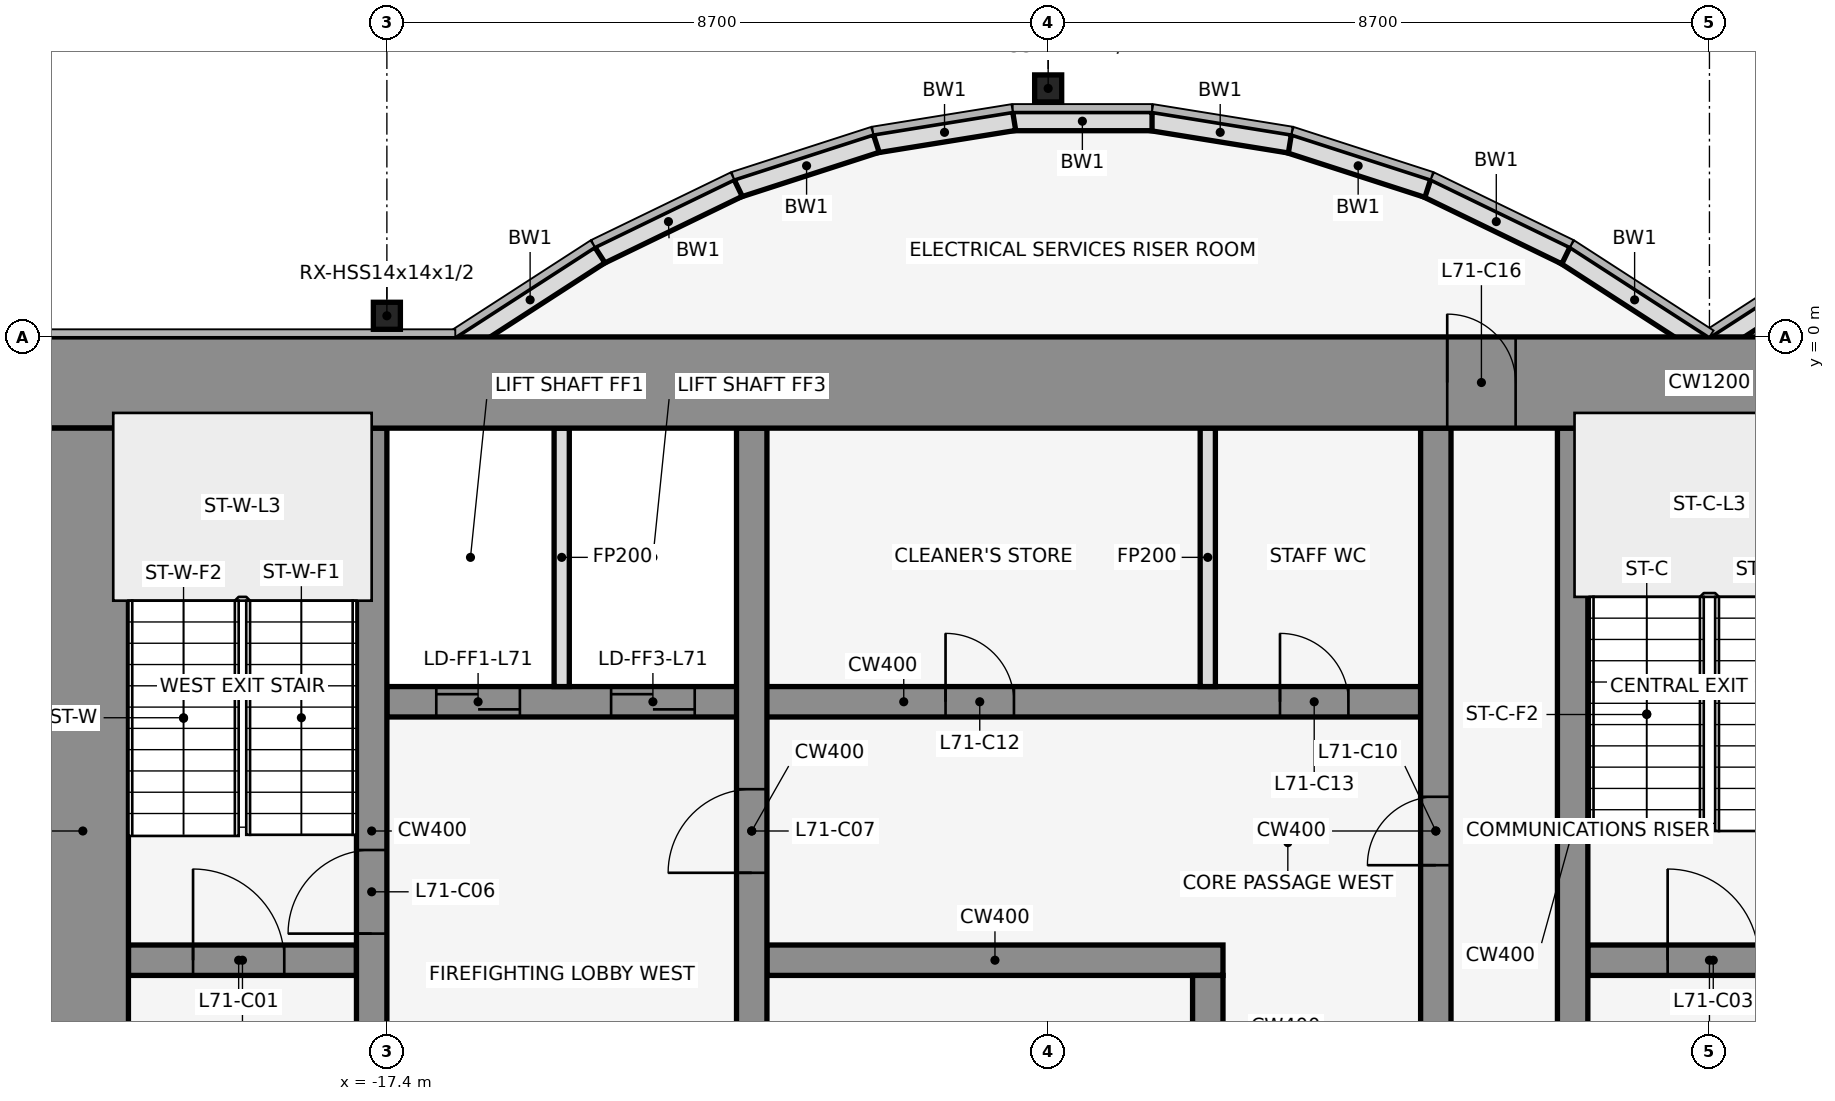
"""IFC4 building model, lengths in metres.
Left out: names, types, materials, properties, quantities, classifications, styles, units other than length and angle.
Written with IfcOpenShell. Run it as: python <this file> out.ifc"""

import sys

from ifc_helpers import new_model, si_unit, direction, frame, frame_2d, origin, origin_2d, place, context, subcontext, project, spatial, rectangle, hollow_rectangle, extrude, element, fill, save


model = new_model("IFC4")
c1 = context("Model", 3, precision=1e-05, world=origin(), true_north=direction((0.0, 1.0)))
c2 = subcontext(c1, "Body", "Model", "MODEL_VIEW")
j1 = project(units=[si_unit("LENGTHUNIT", "METRE"), si_unit("PLANEANGLEUNIT", "RADIAN")], contexts=[c1])
p1 = place(None, origin())
s1 = spatial("IfcSite", under=j1, at=p1, CompositionType="ELEMENT")
p2 = place(p1, origin())
s2 = spatial("IfcBuilding", under=s1, at=p2, CompositionType="ELEMENT")
p3 = place(p2, frame((0.0, 0.0, 315.5)))
s3 = spatial("IfcBuildingStorey", under=s2, at=p3, CompositionType="ELEMENT", Elevation=315.5)
for number, where, z_axis, x_axis in (
    (1, (-8.7, 3.269, 0.0), (0.0, 0.0, 1.0), (1.0, 0.0, 0.0)),
    (2, (-17.4, 0.278, 0.0), (0.0, 0.0, 1.0), (1.0, 0.0, 0.0)),
):
    element("IfcColumn", number, at=place(p3, frame(where, z_axis=z_axis, x_axis=x_axis)), inside=s3, PredefinedType="COLUMN", context=c2, shape_type="SweptSolid", body=[
        extrude(hollow_rectangle(XDim=0.356, YDim=0.356, WallThickness=0.012, at=origin_2d()), origin(), (0.0, 0.0, 1.0), 4.5),
    ])
for number, where, z_axis, x_axis in (
    (3, (1.901, 1.08, 0.0), (0.0, 0.0, 1.0), (-0.84, -0.543, 0.0)),
    (4, (-0.068, -0.105, 0.0), (0.0, 0.0, 1.0), (-0.84, 0.543, 0.0)),
):
    element("IfcWall", number, at=place(p3, frame(where, z_axis=z_axis, x_axis=x_axis)), inside=s3, PredefinedType="STANDARD", context=c2, shape_type="SweptSolid", body=[
        extrude(rectangle(XDim=2.183, YDim=0.25, at=frame_2d((1.091, 0.0))), origin(), (0.0, 0.0, 1.0), 4.35),
    ])
p4 = place(p3, frame((-1.888, 1.073, 0.0), z_axis=(0.0, 0.0, 1.0), x_axis=(-0.89982408427, 0.436252928206, 0.0)))
e5 = element("IfcWall", 5, at=p4, inside=s3, PredefinedType="STANDARD", context=c2, shape_type="SweptSolid", body=[
    extrude(rectangle(XDim=2.038, YDim=0.25, at=frame_2d((1.019, 0.0))), origin(), (0.0, 0.0, 1.0), 4.35),
])
p5 = place(p3, frame((-3.705, 1.955, 0.0), z_axis=(0.0, 0.0, 1.0), x_axis=(-0.951495806175, 0.307661714928, 0.0)))
e6 = element("IfcWall", 6, at=p5, inside=s3, PredefinedType="STANDARD", context=c2, shape_type="SweptSolid", body=[
    extrude(rectangle(XDim=1.927, YDim=0.25, at=frame_2d((0.963, 0.0))), origin(), (0.0, 0.0, 1.0), 4.35),
])
p6 = place(p3, frame((-5.52, 2.543, 0.0), z_axis=(0.0, 0.0, 1.0), x_axis=(-0.987181718931, 0.159600293885, 0.0)))
e7 = element("IfcWall", 7, at=p6, inside=s3, PredefinedType="STANDARD", context=c2, shape_type="SweptSolid", body=[
    extrude(rectangle(XDim=1.857, YDim=0.25, at=frame_2d((0.929, 0.0))), origin(), (0.0, 0.0, 1.0), 4.35),
])
p7 = place(p3, frame((-7.333, 2.838, 0.0), z_axis=(0.0, 0.0, 1.0), x_axis=(-1.0, 0.0, 0.0)))
e8 = element("IfcWall", 8, at=p7, inside=s3, PredefinedType="STANDARD", context=c2, shape_type="SweptSolid", body=[
    extrude(rectangle(XDim=1.833, YDim=0.25, at=frame_2d((0.917, 0.0))), origin(), (0.0, 0.0, 1.0), 4.35),
])
p8 = place(p3, frame((-9.147, 2.84, 0.0), z_axis=(0.0, 0.0, 1.0), x_axis=(-0.987181718931, -0.159600293885, 0.0)))
e9 = element("IfcWall", 9, at=p8, inside=s3, PredefinedType="STANDARD", context=c2, shape_type="SweptSolid", body=[
    extrude(rectangle(XDim=1.857, YDim=0.25, at=frame_2d((0.929, 0.0))), origin(), (0.0, 0.0, 1.0), 4.35),
])
p9 = place(p3, frame((-10.962, 2.548, 0.0), z_axis=(0.0, 0.0, 1.0), x_axis=(-0.951495806175, -0.307661714928, 0.0)))
e10 = element("IfcWall", 10, at=p9, inside=s3, PredefinedType="STANDARD", context=c2, shape_type="SweptSolid", body=[
    extrude(rectangle(XDim=1.927, YDim=0.25, at=frame_2d((0.963, 0.0))), origin(), (0.0, 0.0, 1.0), 4.35),
])
p10 = place(p3, frame((-12.779, 1.962, 0.0), z_axis=(0.0, 0.0, 1.0), x_axis=(-0.89982408427, -0.436252928206, 0.0)))
e11 = element("IfcWall", 11, at=p10, inside=s3, PredefinedType="STANDARD", context=c2, shape_type="SweptSolid", body=[
    extrude(rectangle(XDim=2.038, YDim=0.25, at=frame_2d((1.019, 0.0))), origin(), (0.0, 0.0, 1.0), 4.35),
])
p11 = place(p3, frame((-14.599, 1.08, 0.0), z_axis=(0.0, 0.0, 1.0), x_axis=(-0.83981312244, -0.542875602121, 0.0)))
e12 = element("IfcWall", 12, at=p11, inside=s3, PredefinedType="STANDARD", context=c2, shape_type="SweptSolid", body=[
    extrude(rectangle(XDim=2.183, YDim=0.25, at=frame_2d((1.091, 0.0))), origin(), (0.0, 0.0, 1.0), 4.35),
])
p12 = place(p3, frame((-20.8, -8.2, 0.0), z_axis=(0.0, 0.0, 1.0), x_axis=(1.0, 0.0, 0.0)))
e13 = element("IfcWall", 13, at=p12, inside=s3, PredefinedType="SHEAR", context=c2, shape_type="SweptSolid", body=[
    extrude(rectangle(XDim=3.0, YDim=0.4, at=frame_2d((1.5, 0.0))), origin(), (0.0, 0.0, 1.0), 4.5),
])
p13 = place(p12, frame((0.85, 0.0, 0.0)))
e14 = element("IfcOpeningElement", 14, at=p13, cuts=e13, PredefinedType="OPENING", context=c2, shape_type="SweptSolid", body=[
    extrude(rectangle(XDim=1.2, YDim=2.1, at=frame_2d((0.6, 1.05))), frame((0.0, 0.212, 0.0), z_axis=(0.0, -1.0, 0.0), x_axis=(1.0, 0.0, 0.0)), (0.0, 0.0, 1.0), 0.424),
])
p14 = place(p3, frame((-12.4, -8.2, 0.0), z_axis=(0.0, 0.0, 1.0), x_axis=(1.0, 0.0, 0.0)))
e15 = element("IfcWall", 15, at=p14, inside=s3, PredefinedType="SHEAR", context=c2, shape_type="SweptSolid", body=[
    extrude(rectangle(XDim=6.0, YDim=0.4, at=frame_2d((3.0, 0.0))), origin(), (0.0, 0.0, 1.0), 4.5),
])
p15 = place(p3, frame((-1.6, -8.2, 0.0), z_axis=(0.0, 0.0, 1.0), x_axis=(1.0, 0.0, 0.0)))
e16 = element("IfcWall", 16, at=p15, inside=s3, PredefinedType="SHEAR", context=c2, shape_type="SweptSolid", body=[
    extrude(rectangle(XDim=3.2, YDim=0.4, at=frame_2d((1.6, 0.0))), origin(), (0.0, 0.0, 1.0), 4.5),
])
p16 = place(p15, frame((1.05, 0.0, 0.0)))
e17 = element("IfcOpeningElement", 17, at=p16, cuts=e16, PredefinedType="OPENING", context=c2, shape_type="SweptSolid", body=[
    extrude(rectangle(XDim=1.2, YDim=2.1, at=frame_2d((0.6, 1.05))), frame((0.0, 0.212, 0.0), z_axis=(0.0, -1.0, 0.0), x_axis=(1.0, 0.0, 0.0)), (0.0, 0.0, 1.0), 0.424),
])
p17 = place(p3, frame((-17.4, -4.8, 0.0), z_axis=(0.0, 0.0, 1.0), x_axis=(1.0, 0.0, 0.0)))
e18 = element("IfcWall", 18, at=p17, inside=s3, PredefinedType="SHEAR", context=c2, shape_type="SweptSolid", body=[
    extrude(rectangle(XDim=13.6, YDim=0.4, at=frame_2d((6.8, 0.0))), origin(), (0.0, 0.0, 1.0), 4.5),
])
p18 = place(p17, frame((0.65, 0.0, 0.0)))
e19 = element("IfcOpeningElement", 19, at=p18, cuts=e18, PredefinedType="OPENING", context=c2, shape_type="SweptSolid", body=[
    extrude(rectangle(XDim=1.1, YDim=2.1, at=frame_2d((0.55, 1.05))), frame((0.0, 0.212, 0.0), z_axis=(0.0, -1.0, 0.0), x_axis=(1.0, 0.0, 0.0)), (0.0, 0.0, 1.0), 0.424),
])
p19 = place(p17, frame((2.95, 0.0, 0.0)))
e20 = element("IfcOpeningElement", 20, at=p19, cuts=e18, PredefinedType="OPENING", context=c2, shape_type="SweptSolid", body=[
    extrude(rectangle(XDim=1.1, YDim=2.1, at=frame_2d((0.55, 1.05))), frame((0.0, 0.212, 0.0), z_axis=(0.0, -1.0, 0.0), x_axis=(1.0, 0.0, 0.0)), (0.0, 0.0, 1.0), 0.424),
])
p20 = place(p17, frame((7.35, 0.0, 0.0)))
e21 = element("IfcOpeningElement", 21, at=p20, cuts=e18, PredefinedType="OPENING", context=c2, shape_type="SweptSolid", body=[
    extrude(rectangle(XDim=0.9, YDim=2.1, at=frame_2d((0.45, 1.05))), frame((0.0, 0.212, 0.0), z_axis=(0.0, -1.0, 0.0), x_axis=(1.0, 0.0, 0.0)), (0.0, 0.0, 1.0), 0.424),
])
p21 = place(p17, frame((11.75, 0.0, 0.0)))
e22 = element("IfcOpeningElement", 22, at=p21, cuts=e18, PredefinedType="OPENING", context=c2, shape_type="SweptSolid", body=[
    extrude(rectangle(XDim=0.9, YDim=2.1, at=frame_2d((0.45, 1.05))), frame((0.0, 0.212, 0.0), z_axis=(0.0, -1.0, 0.0), x_axis=(1.0, 0.0, 0.0)), (0.0, 0.0, 1.0), 0.424),
])
p22 = place(p3, frame((-17.6, -11.8, 0.0), z_axis=(0.0, 0.0, 1.0), x_axis=(0.0, 1.0, 0.0)))
e23 = element("IfcWall", 23, at=p22, inside=s3, PredefinedType="SHEAR", context=c2, shape_type="SweptSolid", body=[
    extrude(rectangle(XDim=10.6, YDim=0.4, at=frame_2d((5.3, 0.0))), origin(), (0.0, 0.0, 1.0), 4.5),
])
p23 = place(p22, frame((1.25, 0.0, 0.0)))
e24 = element("IfcOpeningElement", 24, at=p23, cuts=e23, PredefinedType="OPENING", context=c2, shape_type="SweptSolid", body=[
    extrude(rectangle(XDim=1.1, YDim=2.1, at=frame_2d((0.55, 1.05))), frame((0.0, 0.212, 0.0), z_axis=(0.0, -1.0, 0.0), x_axis=(1.0, 0.0, 0.0)), (0.0, 0.0, 1.0), 0.424),
])
p24 = place(p22, frame((3.95, 0.0, 0.0)))
e25 = element("IfcOpeningElement", 25, at=p24, cuts=e23, PredefinedType="OPENING", context=c2, shape_type="SweptSolid", body=[
    extrude(rectangle(XDim=1.1, YDim=2.1, at=frame_2d((0.55, 1.05))), frame((0.0, 0.212, 0.0), z_axis=(0.0, -1.0, 0.0), x_axis=(1.0, 0.0, 0.0)), (0.0, 0.0, 1.0), 0.424),
])
p25 = place(p3, frame((-15.1, -4.6, 0.0), z_axis=(0.0, 0.0, 1.0), x_axis=(0.0, 1.0, 0.0)))
e26 = element("IfcWall", 26, at=p25, inside=s3, PredefinedType="PARTITIONING", context=c2, shape_type="SweptSolid", body=[
    extrude(rectangle(XDim=3.4, YDim=0.2, at=frame_2d((1.7, 0.0))), origin(), (0.0, 0.0, 1.0), 3.418),
])
p26 = place(p3, frame((-12.6, -11.8, 0.0), z_axis=(0.0, 0.0, 1.0), x_axis=(0.0, 1.0, 0.0)))
e27 = element("IfcWall", 27, at=p26, inside=s3, PredefinedType="SHEAR", context=c2, shape_type="SweptSolid", body=[
    extrude(rectangle(XDim=10.6, YDim=0.4, at=frame_2d((5.3, 0.0))), origin(), (0.0, 0.0, 1.0), 4.5),
])
p27 = place(p26, frame((4.75, 0.0, 0.0)))
e28 = element("IfcOpeningElement", 28, at=p27, cuts=e27, PredefinedType="OPENING", context=c2, shape_type="SweptSolid", body=[
    extrude(rectangle(XDim=1.1, YDim=2.1, at=frame_2d((0.55, 1.05))), frame((0.0, 0.212, 0.0), z_axis=(0.0, -1.0, 0.0), x_axis=(1.0, 0.0, 0.0)), (0.0, 0.0, 1.0), 0.424),
])
p28 = place(p3, frame((-6.6, -11.8, 0.0), z_axis=(0.0, 0.0, 1.0), x_axis=(0.0, 1.0, 0.0)))
e29 = element("IfcWall", 29, at=p28, inside=s3, PredefinedType="SHEAR", context=c2, shape_type="SweptSolid", body=[
    extrude(rectangle(XDim=3.4, YDim=0.4, at=frame_2d((1.7, 0.0))), origin(), (0.0, 0.0, 1.0), 4.5),
])
p29 = place(p28, frame((1.25, 0.0, 0.0)))
e30 = element("IfcOpeningElement", 30, at=p29, cuts=e29, PredefinedType="OPENING", context=c2, shape_type="SweptSolid", body=[
    extrude(rectangle(XDim=0.9, YDim=2.1, at=frame_2d((0.45, 1.05))), frame((0.0, 0.212, 0.0), z_axis=(0.0, -1.0, 0.0), x_axis=(1.0, 0.0, 0.0)), (0.0, 0.0, 1.0), 0.424),
])
p30 = place(p3, frame((-6.6, -4.6, 0.0), z_axis=(0.0, 0.0, 1.0), x_axis=(0.0, 1.0, 0.0)))
e31 = element("IfcWall", 31, at=p30, inside=s3, PredefinedType="PARTITIONING", context=c2, shape_type="SweptSolid", body=[
    extrude(rectangle(XDim=3.4, YDim=0.2, at=frame_2d((1.7, 0.0))), origin(), (0.0, 0.0, 1.0), 3.418),
])
p31 = place(p3, frame((-3.6, -11.8, 0.0), z_axis=(0.0, 0.0, 1.0), x_axis=(0.0, 1.0, 0.0)))
e32 = element("IfcWall", 32, at=p31, inside=s3, PredefinedType="SHEAR", context=c2, shape_type="SweptSolid", body=[
    extrude(rectangle(XDim=10.6, YDim=0.4, at=frame_2d((5.3, 0.0))), origin(), (0.0, 0.0, 1.0), 4.5),
])
p32 = place(p31, frame((4.85, 0.0, 0.0)))
e33 = element("IfcOpeningElement", 33, at=p32, cuts=e32, PredefinedType="OPENING", context=c2, shape_type="SweptSolid", body=[
    extrude(rectangle(XDim=0.9, YDim=2.1, at=frame_2d((0.45, 1.05))), frame((0.0, 0.212, 0.0), z_axis=(0.0, -1.0, 0.0), x_axis=(1.0, 0.0, 0.0)), (0.0, 0.0, 1.0), 0.424),
])
p33 = place(p3, frame((-1.8, -11.8, 0.0), z_axis=(0.0, 0.0, 1.0), x_axis=(0.0, 1.0, 0.0)))
e34 = element("IfcWall", 34, at=p33, inside=s3, PredefinedType="SHEAR", context=c2, shape_type="SweptSolid", body=[
    extrude(rectangle(XDim=10.6, YDim=0.4, at=frame_2d((5.3, 0.0))), origin(), (0.0, 0.0, 1.0), 4.5),
])
p34 = place(p3, frame((-22.0, -0.6, 0.0), z_axis=(0.0, 0.0, 1.0), x_axis=(1.0, 0.0, 0.0)))
e35 = element("IfcWall", 35, at=p34, inside=s3, PredefinedType="SHEAR", context=c2, shape_type="SweptSolid", body=[
    extrude(rectangle(XDim=44.0, YDim=1.2, at=frame_2d((22.0, 0.0))), origin(), (0.0, 0.0, 1.0), 4.5),
])
p35 = place(p34, frame((18.55, 0.0, 0.0)))
e36 = element("IfcOpeningElement", 36, at=p35, cuts=e35, PredefinedType="OPENING", context=c2, shape_type="SweptSolid", body=[
    extrude(rectangle(XDim=0.9, YDim=2.1, at=frame_2d((0.45, 1.05))), frame((0.0, 0.612, 0.0), z_axis=(0.0, -1.0, 0.0), x_axis=(1.0, 0.0, 0.0)), (0.0, 0.0, 1.0), 1.224),
])
p36 = place(p34, frame((24.55, 0.0, 0.0)))
e37 = element("IfcOpeningElement", 37, at=p36, cuts=e35, PredefinedType="OPENING", context=c2, shape_type="SweptSolid", body=[
    extrude(rectangle(XDim=0.9, YDim=2.1, at=frame_2d((0.45, 1.05))), frame((0.0, 0.612, 0.0), z_axis=(0.0, -1.0, 0.0), x_axis=(1.0, 0.0, 0.0)), (0.0, 0.0, 1.0), 1.224),
])
p37 = place(p3, frame((-21.4, -11.8, 0.0), z_axis=(0.0, 0.0, 1.0), x_axis=(0.0, 1.0, 0.0)))
e38 = element("IfcWall", 38, at=p37, inside=s3, PredefinedType="SHEAR", context=c2, shape_type="SweptSolid", body=[
    extrude(rectangle(XDim=10.6, YDim=1.2, at=frame_2d((5.3, 0.0))), origin(), (0.0, 0.0, 1.0), 4.5),
])
p38 = place(p13, origin())
e39 = element("IfcDoor", 39, at=p38, inside=s3, OperationType="SINGLE_SWING_LEFT", PredefinedType="DOOR", context=c2, shape_type="SweptSolid", body=[
    extrude(rectangle(XDim=1.2, YDim=2.1, at=frame_2d((0.6, 1.05))), frame((0.0, 0.025, 0.0), z_axis=(0.0, -1.0, 0.0), x_axis=(1.0, 0.0, 0.0)), (0.0, 0.0, 1.0), 0.05),
])
fill(e14, e39)
p39 = place(p16, origin())
e40 = element("IfcDoor", 40, at=p39, inside=s3, OperationType="SINGLE_SWING_LEFT", PredefinedType="DOOR", context=c2, shape_type="SweptSolid", body=[
    extrude(rectangle(XDim=1.2, YDim=2.1, at=frame_2d((0.6, 1.05))), frame((0.0, 0.025, 0.0), z_axis=(0.0, -1.0, 0.0), x_axis=(1.0, 0.0, 0.0)), (0.0, 0.0, 1.0), 0.05),
])
fill(e17, e40)
p40 = place(p18, origin())
e41 = element("IfcDoor", 41, at=p40, inside=s3, OperationType="DOUBLE_DOOR_SLIDING", PredefinedType="DOOR", context=c2, shape_type="SweptSolid", body=[
    extrude(rectangle(XDim=1.1, YDim=2.1, at=frame_2d((0.55, 1.05))), frame((0.0, 0.025, 0.0), z_axis=(0.0, -1.0, 0.0), x_axis=(1.0, 0.0, 0.0)), (0.0, 0.0, 1.0), 0.05),
])
fill(e19, e41)
p41 = place(p19, origin())
e42 = element("IfcDoor", 42, at=p41, inside=s3, OperationType="DOUBLE_DOOR_SLIDING", PredefinedType="DOOR", context=c2, shape_type="SweptSolid", body=[
    extrude(rectangle(XDim=1.1, YDim=2.1, at=frame_2d((0.55, 1.05))), frame((0.0, 0.025, 0.0), z_axis=(0.0, -1.0, 0.0), x_axis=(1.0, 0.0, 0.0)), (0.0, 0.0, 1.0), 0.05),
])
fill(e20, e42)
p42 = place(p24, frame((1.1, 0.0, 0.0), z_axis=(0.0, 0.0, 1.0), x_axis=(-1.0, 0.0, 0.0)))
e43 = element("IfcDoor", 43, at=p42, inside=s3, OperationType="SINGLE_SWING_LEFT", PredefinedType="DOOR", context=c2, shape_type="SweptSolid", body=[
    extrude(rectangle(XDim=1.1, YDim=2.1, at=frame_2d((0.55, 1.05))), frame((0.0, 0.025, 0.0), z_axis=(0.0, -1.0, 0.0), x_axis=(1.0, 0.0, 0.0)), (0.0, 0.0, 1.0), 0.05),
])
fill(e25, e43)
p43 = place(p27, origin())
e44 = element("IfcDoor", 44, at=p43, inside=s3, OperationType="SINGLE_SWING_LEFT", PredefinedType="DOOR", context=c2, shape_type="SweptSolid", body=[
    extrude(rectangle(XDim=1.1, YDim=2.1, at=frame_2d((0.55, 1.05))), frame((0.0, 0.025, 0.0), z_axis=(0.0, -1.0, 0.0), x_axis=(1.0, 0.0, 0.0)), (0.0, 0.0, 1.0), 0.05),
])
fill(e28, e44)
p44 = place(p32, frame((0.9, 0.0, 0.0), z_axis=(0.0, 0.0, 1.0), x_axis=(-1.0, 0.0, 0.0)))
e45 = element("IfcDoor", 45, at=p44, inside=s3, OperationType="SINGLE_SWING_LEFT", PredefinedType="DOOR", context=c2, shape_type="SweptSolid", body=[
    extrude(rectangle(XDim=0.9, YDim=2.1, at=frame_2d((0.45, 1.05))), frame((0.0, 0.025, 0.0), z_axis=(0.0, -1.0, 0.0), x_axis=(1.0, 0.0, 0.0)), (0.0, 0.0, 1.0), 0.05),
])
fill(e33, e45)
p45 = place(p20, origin())
e46 = element("IfcDoor", 46, at=p45, inside=s3, OperationType="SINGLE_SWING_RIGHT", PredefinedType="DOOR", context=c2, shape_type="SweptSolid", body=[
    extrude(rectangle(XDim=0.9, YDim=2.1, at=frame_2d((0.45, 1.05))), frame((0.0, 0.025, 0.0), z_axis=(0.0, -1.0, 0.0), x_axis=(1.0, 0.0, 0.0)), (0.0, 0.0, 1.0), 0.05),
])
fill(e21, e46)
p46 = place(p21, origin())
e47 = element("IfcDoor", 47, at=p46, inside=s3, OperationType="SINGLE_SWING_LEFT", PredefinedType="DOOR", context=c2, shape_type="SweptSolid", body=[
    extrude(rectangle(XDim=0.9, YDim=2.1, at=frame_2d((0.45, 1.05))), frame((0.0, 0.025, 0.0), z_axis=(0.0, -1.0, 0.0), x_axis=(1.0, 0.0, 0.0)), (0.0, 0.0, 1.0), 0.05),
])
fill(e22, e47)
p47 = place(p35, origin())
e48 = element("IfcDoor", 48, at=p47, inside=s3, OperationType="SINGLE_SWING_LEFT", PredefinedType="DOOR", context=c2, shape_type="SweptSolid", body=[
    extrude(rectangle(XDim=0.9, YDim=2.1, at=frame_2d((0.45, 1.05))), frame((0.0, 0.025, 0.0), z_axis=(0.0, -1.0, 0.0), x_axis=(1.0, 0.0, 0.0)), (0.0, 0.0, 1.0), 0.05),
])
fill(e36, e48)
save(model, sys.argv[1])
